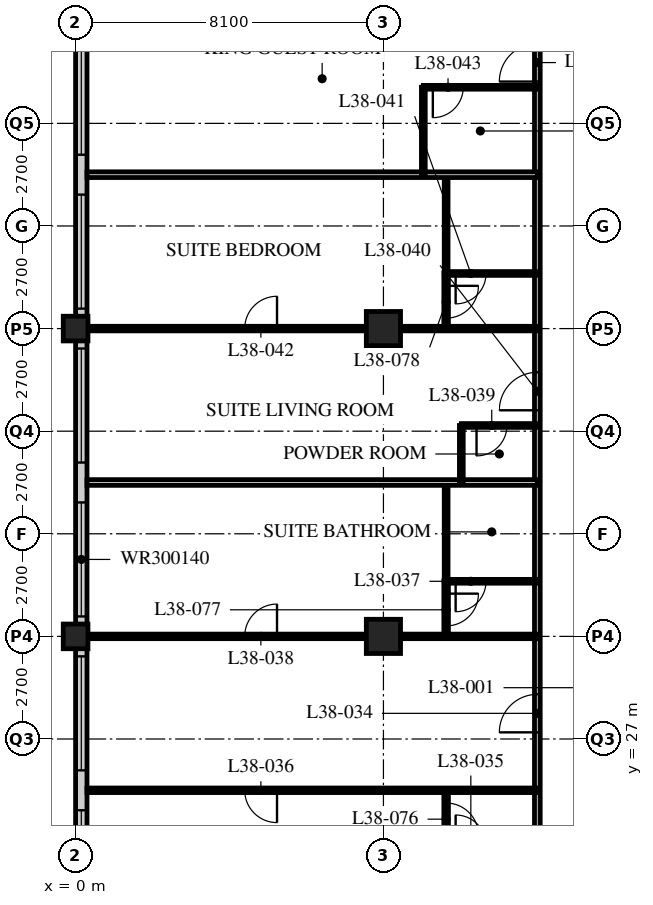
"""IFC4 building model, lengths in metres.
Left out: names, types, materials, properties, quantities, classifications, styles, units other than length and angle.
Written with IfcOpenShell. Run it as: python <this file> out.ifc"""

import sys

from ifc_helpers import new_model, si_unit, direction, frame, frame_2d, origin, origin_2d, place, context, subcontext, project, spatial, rectangle, hollow_rectangle, extrude, element, fill, save


model = new_model("IFC4")
c1 = context("Model", 3, precision=1e-05, world=origin(), true_north=direction((0.0, 1.0)))
c2 = subcontext(c1, "Body", "Model", "MODEL_VIEW")
j1 = project(units=[si_unit("LENGTHUNIT", "METRE"), si_unit("PLANEANGLEUNIT", "RADIAN")], contexts=[c1])
p1 = place(None, origin())
s1 = spatial("IfcSite", under=j1, at=p1, CompositionType="ELEMENT")
p2 = place(p1, origin())
s2 = spatial("IfcBuilding", under=s1, at=p2, CompositionType="ELEMENT")
p3 = place(p2, frame((0.0, 0.0, 147.6)))
s3 = spatial("IfcBuildingStorey", under=s2, at=p3, CompositionType="ELEMENT", Elevation=147.6)
for number, where, z_axis, x_axis in (
    (1, (0.0, 29.7, 0.0), (0.0, 0.0, 1.0), (1.0, 0.0, 0.0)),
    (2, (0.0, 37.8, 0.0), (0.0, 0.0, 1.0), (1.0, 0.0, 0.0)),
):
    element("IfcColumn", number, at=place(p3, frame(where, z_axis=z_axis, x_axis=x_axis)), inside=s3, PredefinedType="COLUMN", context=c2, shape_type="SweptSolid", body=[
        extrude(hollow_rectangle(XDim=0.65, YDim=0.65, WallThickness=0.055, at=origin_2d()), origin(), (0.0, 0.0, 1.0), 3.4),
    ])
for number, where, z_axis, x_axis in (
    (3, (8.1, 29.7, 0.0), (0.0, 0.0, 1.0), (1.0, 0.0, 0.0)),
    (4, (8.1, 37.8, 0.0), (0.0, 0.0, 1.0), (1.0, 0.0, 0.0)),
):
    element("IfcColumn", number, at=place(p3, frame(where, z_axis=z_axis, x_axis=x_axis)), inside=s3, PredefinedType="COLUMN", context=c2, shape_type="SweptSolid", body=[
        extrude(hollow_rectangle(XDim=0.9, YDim=0.9, WallThickness=0.1, at=origin_2d()), origin(), (0.0, 0.0, 1.0), 3.4),
    ])
p4 = place(p3, frame((0.15, 45.6, 0.0), z_axis=(0.0, 0.0, 1.0), x_axis=(0.0, -1.0, 0.0)))
e5 = element("IfcWall", 5, at=p4, inside=s3, PredefinedType="SOLIDWALL", context=c2, shape_type="SweptSolid", body=[
    extrude(rectangle(XDim=32.1, YDim=0.3, at=frame_2d((16.05, 0.0))), origin(), (0.0, 0.0, 1.0), 3.19),
])
p5 = place(p4, frame((0.225, 0.0, 0.9)))
e6 = element("IfcOpeningElement", 6, at=p5, cuts=e5, PredefinedType="OPENING", context=c2, shape_type="SweptSolid", body=[
    extrude(rectangle(XDim=3.0, YDim=1.4, at=frame_2d((1.5, 0.7))), frame((0.0, 0.16, 0.0), z_axis=(0.0, -1.0, 0.0), x_axis=(1.0, 0.0, 0.0)), (0.0, 0.0, 1.0), 0.32),
])
p6 = place(p4, frame((4.275, 0.0, 0.9)))
e7 = element("IfcOpeningElement", 7, at=p6, cuts=e5, PredefinedType="OPENING", context=c2, shape_type="SweptSolid", body=[
    extrude(rectangle(XDim=3.0, YDim=1.4, at=frame_2d((1.5, 0.7))), frame((0.0, 0.16, 0.0), z_axis=(0.0, -1.0, 0.0), x_axis=(1.0, 0.0, 0.0)), (0.0, 0.0, 1.0), 0.32),
])
p7 = place(p4, frame((8.325, 0.0, 0.9)))
e8 = element("IfcOpeningElement", 8, at=p7, cuts=e5, PredefinedType="OPENING", context=c2, shape_type="SweptSolid", body=[
    extrude(rectangle(XDim=3.0, YDim=1.4, at=frame_2d((1.5, 0.7))), frame((0.0, 0.16, 0.0), z_axis=(0.0, -1.0, 0.0), x_axis=(1.0, 0.0, 0.0)), (0.0, 0.0, 1.0), 0.32),
])
p8 = place(p4, frame((12.375, 0.0, 0.9)))
e9 = element("IfcOpeningElement", 9, at=p8, cuts=e5, PredefinedType="OPENING", context=c2, shape_type="SweptSolid", body=[
    extrude(rectangle(XDim=3.0, YDim=1.4, at=frame_2d((1.5, 0.7))), frame((0.0, 0.16, 0.0), z_axis=(0.0, -1.0, 0.0), x_axis=(1.0, 0.0, 0.0)), (0.0, 0.0, 1.0), 0.32),
])
p9 = place(p4, frame((16.425, 0.0, 0.9)))
e10 = element("IfcOpeningElement", 10, at=p9, cuts=e5, PredefinedType="OPENING", context=c2, shape_type="SweptSolid", body=[
    extrude(rectangle(XDim=3.0, YDim=1.4, at=frame_2d((1.5, 0.7))), frame((0.0, 0.16, 0.0), z_axis=(0.0, -1.0, 0.0), x_axis=(1.0, 0.0, 0.0)), (0.0, 0.0, 1.0), 0.32),
])
p10 = place(p4, frame((20.475, 0.0, 0.9)))
e11 = element("IfcOpeningElement", 11, at=p10, cuts=e5, PredefinedType="OPENING", context=c2, shape_type="SweptSolid", body=[
    extrude(rectangle(XDim=3.0, YDim=1.4, at=frame_2d((1.5, 0.7))), frame((0.0, 0.16, 0.0), z_axis=(0.0, -1.0, 0.0), x_axis=(1.0, 0.0, 0.0)), (0.0, 0.0, 1.0), 0.32),
])
p11 = place(p4, frame((24.525, 0.0, 0.9)))
e12 = element("IfcOpeningElement", 12, at=p11, cuts=e5, PredefinedType="OPENING", context=c2, shape_type="SweptSolid", body=[
    extrude(rectangle(XDim=3.0, YDim=1.4, at=frame_2d((1.5, 0.7))), frame((0.0, 0.16, 0.0), z_axis=(0.0, -1.0, 0.0), x_axis=(1.0, 0.0, 0.0)), (0.0, 0.0, 1.0), 0.32),
])
p12 = place(p4, frame((28.575, 0.0, 0.9)))
e13 = element("IfcOpeningElement", 13, at=p12, cuts=e5, PredefinedType="OPENING", context=c2, shape_type="SweptSolid", body=[
    extrude(rectangle(XDim=3.0, YDim=1.4, at=frame_2d((1.5, 0.7))), frame((0.0, 0.16, 0.0), z_axis=(0.0, -1.0, 0.0), x_axis=(1.0, 0.0, 0.0)), (0.0, 0.0, 1.0), 0.32),
])
p13 = place(p3, frame((12.15, 21.6, 0.0), z_axis=(0.0, 0.0, 1.0), x_axis=(0.0, 1.0, 0.0)))
e14 = element("IfcWall", 14, at=p13, inside=s3, PredefinedType="PARTITIONING", context=c2, shape_type="SweptSolid", body=[
    extrude(rectangle(XDim=24.3, YDim=0.15, at=frame_2d((12.15, 0.0))), origin(), (0.0, 0.0, 1.0), 3.19),
])
p14 = place(p13, frame((5.575, 0.0, 0.0)))
e15 = element("IfcOpeningElement", 15, at=p14, cuts=e14, PredefinedType="OPENING", context=c2, shape_type="SweptSolid", body=[
    extrude(rectangle(XDim=1.0, YDim=2.1, at=frame_2d((0.5, 1.05))), frame((0.0, 0.085, 0.0), z_axis=(0.0, -1.0, 0.0), x_axis=(1.0, 0.0, 0.0)), (0.0, 0.0, 1.0), 0.17),
])
p15 = place(p13, frame((14.05, 0.0, 0.0)))
e16 = element("IfcOpeningElement", 16, at=p15, cuts=e14, PredefinedType="OPENING", context=c2, shape_type="SweptSolid", body=[
    extrude(rectangle(XDim=1.0, YDim=2.1, at=frame_2d((0.5, 1.05))), frame((0.0, 0.085, 0.0), z_axis=(0.0, -1.0, 0.0), x_axis=(1.0, 0.0, 0.0)), (0.0, 0.0, 1.0), 0.17),
])
p16 = place(p13, frame((22.7, 0.0, 0.0)))
e17 = element("IfcOpeningElement", 17, at=p16, cuts=e14, PredefinedType="OPENING", context=c2, shape_type="SweptSolid", body=[
    extrude(rectangle(XDim=1.0, YDim=2.1, at=frame_2d((0.5, 1.05))), frame((0.0, 0.085, 0.0), z_axis=(0.0, -1.0, 0.0), x_axis=(1.0, 0.0, 0.0)), (0.0, 0.0, 1.0), 0.17),
])
p17 = place(p3, frame((12.15, 25.65, 0.0), z_axis=(0.0, 0.0, 1.0), x_axis=(-1.0, 0.0, 0.0)))
e18 = element("IfcWall", 18, at=p17, inside=s3, PredefinedType="PARTITIONING", context=c2, shape_type="SweptSolid", body=[
    extrude(rectangle(XDim=11.85, YDim=0.12, at=frame_2d((5.925, 0.0))), origin(), (0.0, 0.0, 1.0), 3.19),
])
p18 = place(p17, frame((6.85, 0.0, 0.0)))
e19 = element("IfcOpeningElement", 19, at=p18, cuts=e18, PredefinedType="OPENING", context=c2, shape_type="SweptSolid", body=[
    extrude(rectangle(XDim=0.85, YDim=2.1, at=frame_2d((0.425, 1.05))), frame((0.0, 0.07, 0.0), z_axis=(0.0, -1.0, 0.0), x_axis=(1.0, 0.0, 0.0)), (0.0, 0.0, 1.0), 0.14),
])
p19 = place(p3, frame((9.75, 31.15, 0.0), z_axis=(0.0, 0.0, 1.0), x_axis=(0.0, 1.0, 0.0)))
e20 = element("IfcWall", 20, at=p19, inside=s3, PredefinedType="PARTITIONING", context=c2, shape_type="SweptSolid", body=[
    extrude(rectangle(XDim=2.6, YDim=0.1, at=frame_2d((1.3, 0.0))), origin(), (0.0, 0.0, 1.0), 3.19),
])
p20 = place(p3, frame((12.15, 31.15, 0.0), z_axis=(0.0, 0.0, 1.0), x_axis=(-1.0, 0.0, 0.0)))
e21 = element("IfcWall", 21, at=p20, inside=s3, PredefinedType="PARTITIONING", context=c2, shape_type="SweptSolid", body=[
    extrude(rectangle(XDim=2.4, YDim=0.1, at=frame_2d((1.2, 0.0))), origin(), (0.0, 0.0, 1.0), 3.19),
])
p21 = place(p20, frame((1.35, 0.0, 0.0)))
e22 = element("IfcOpeningElement", 22, at=p21, cuts=e21, PredefinedType="OPENING", context=c2, shape_type="SweptSolid", body=[
    extrude(rectangle(XDim=0.8, YDim=2.1, at=frame_2d((0.4, 1.05))), frame((0.0, 0.06, 0.0), z_axis=(0.0, -1.0, 0.0), x_axis=(1.0, 0.0, 0.0)), (0.0, 0.0, 1.0), 0.12),
])
p22 = place(p3, frame((12.15, 29.7, 0.0), z_axis=(0.0, 0.0, 1.0), x_axis=(-1.0, 0.0, 0.0)))
e23 = element("IfcWall", 23, at=p22, inside=s3, PredefinedType="PARTITIONING", context=c2, shape_type="SweptSolid", body=[
    extrude(rectangle(XDim=11.85, YDim=0.12, at=frame_2d((5.925, 0.0))), origin(), (0.0, 0.0, 1.0), 2.42),
])
p23 = place(p22, frame((6.85, 0.0, 0.0)))
e24 = element("IfcOpeningElement", 24, at=p23, cuts=e23, PredefinedType="OPENING", context=c2, shape_type="SweptSolid", body=[
    extrude(rectangle(XDim=0.85, YDim=2.1, at=frame_2d((0.425, 1.05))), frame((0.0, 0.07, 0.0), z_axis=(0.0, -1.0, 0.0), x_axis=(1.0, 0.0, 0.0)), (0.0, 0.0, 1.0), 0.14),
])
p24 = place(p3, frame((12.15, 33.75, 0.0), z_axis=(0.0, 0.0, 1.0), x_axis=(-1.0, 0.0, 0.0)))
e25 = element("IfcWall", 25, at=p24, inside=s3, PredefinedType="PARTITIONING", context=c2, shape_type="SweptSolid", body=[
    extrude(rectangle(XDim=11.85, YDim=0.15, at=frame_2d((5.925, 0.0))), origin(), (0.0, 0.0, 1.0), 3.19),
])
p25 = place(p3, frame((10.15, 33.75, 0.0), z_axis=(0.0, 0.0, 1.0), x_axis=(0.0, 1.0, 0.0)))
e26 = element("IfcWall", 26, at=p25, inside=s3, PredefinedType="PARTITIONING", context=c2, shape_type="SweptSolid", body=[
    extrude(rectangle(XDim=1.5, YDim=0.1, at=frame_2d((0.75, 0.0))), origin(), (0.0, 0.0, 1.0), 3.19),
])
p26 = place(p3, frame((12.15, 35.25, 0.0), z_axis=(0.0, 0.0, 1.0), x_axis=(-1.0, 0.0, 0.0)))
e27 = element("IfcWall", 27, at=p26, inside=s3, PredefinedType="PARTITIONING", context=c2, shape_type="SweptSolid", body=[
    extrude(rectangle(XDim=2.0, YDim=0.1, at=frame_2d((1.0, 0.0))), origin(), (0.0, 0.0, 1.0), 3.19),
])
p27 = place(p26, frame((0.8, 0.0, 0.0)))
e28 = element("IfcOpeningElement", 28, at=p27, cuts=e27, PredefinedType="OPENING", context=c2, shape_type="SweptSolid", body=[
    extrude(rectangle(XDim=0.8, YDim=2.1, at=frame_2d((0.4, 1.05))), frame((0.0, 0.06, 0.0), z_axis=(0.0, -1.0, 0.0), x_axis=(1.0, 0.0, 0.0)), (0.0, 0.0, 1.0), 0.12),
])
p28 = place(p3, frame((9.75, 39.25, 0.0), z_axis=(0.0, 0.0, 1.0), x_axis=(0.0, 1.0, 0.0)))
e29 = element("IfcWall", 29, at=p28, inside=s3, PredefinedType="PARTITIONING", context=c2, shape_type="SweptSolid", body=[
    extrude(rectangle(XDim=2.6, YDim=0.1, at=frame_2d((1.3, 0.0))), origin(), (0.0, 0.0, 1.0), 3.19),
])
p29 = place(p3, frame((12.15, 39.25, 0.0), z_axis=(0.0, 0.0, 1.0), x_axis=(-1.0, 0.0, 0.0)))
e30 = element("IfcWall", 30, at=p29, inside=s3, PredefinedType="PARTITIONING", context=c2, shape_type="SweptSolid", body=[
    extrude(rectangle(XDim=2.4, YDim=0.1, at=frame_2d((1.2, 0.0))), origin(), (0.0, 0.0, 1.0), 3.19),
])
p30 = place(p29, frame((1.35, 0.0, 0.0)))
e31 = element("IfcOpeningElement", 31, at=p30, cuts=e30, PredefinedType="OPENING", context=c2, shape_type="SweptSolid", body=[
    extrude(rectangle(XDim=0.8, YDim=2.1, at=frame_2d((0.4, 1.05))), frame((0.0, 0.06, 0.0), z_axis=(0.0, -1.0, 0.0), x_axis=(1.0, 0.0, 0.0)), (0.0, 0.0, 1.0), 0.12),
])
p31 = place(p3, frame((12.15, 37.8, 0.0), z_axis=(0.0, 0.0, 1.0), x_axis=(-1.0, 0.0, 0.0)))
e32 = element("IfcWall", 32, at=p31, inside=s3, PredefinedType="PARTITIONING", context=c2, shape_type="SweptSolid", body=[
    extrude(rectangle(XDim=11.85, YDim=0.12, at=frame_2d((5.925, 0.0))), origin(), (0.0, 0.0, 1.0), 2.42),
])
p32 = place(p31, frame((6.85, 0.0, 0.0)))
e33 = element("IfcOpeningElement", 33, at=p32, cuts=e32, PredefinedType="OPENING", context=c2, shape_type="SweptSolid", body=[
    extrude(rectangle(XDim=0.85, YDim=2.1, at=frame_2d((0.425, 1.05))), frame((0.0, 0.07, 0.0), z_axis=(0.0, -1.0, 0.0), x_axis=(1.0, 0.0, 0.0)), (0.0, 0.0, 1.0), 0.14),
])
p33 = place(p3, frame((12.15, 41.85, 0.0), z_axis=(0.0, 0.0, 1.0), x_axis=(-1.0, 0.0, 0.0)))
e34 = element("IfcWall", 34, at=p33, inside=s3, PredefinedType="PARTITIONING", context=c2, shape_type="SweptSolid", body=[
    extrude(rectangle(XDim=11.85, YDim=0.15, at=frame_2d((5.925, 0.0))), origin(), (0.0, 0.0, 1.0), 3.19),
])
p34 = place(p3, frame((9.15, 41.85, 0.0), z_axis=(0.0, 0.0, 1.0), x_axis=(0.0, 1.0, 0.0)))
e35 = element("IfcWall", 35, at=p34, inside=s3, PredefinedType="PARTITIONING", context=c2, shape_type="SweptSolid", body=[
    extrude(rectangle(XDim=2.3, YDim=0.1, at=frame_2d((1.15, 0.0))), origin(), (0.0, 0.0, 1.0), 3.19),
])
p35 = place(p3, frame((12.15, 44.15, 0.0), z_axis=(0.0, 0.0, 1.0), x_axis=(-1.0, 0.0, 0.0)))
e36 = element("IfcWall", 36, at=p35, inside=s3, PredefinedType="PARTITIONING", context=c2, shape_type="SweptSolid", body=[
    extrude(rectangle(XDim=3.0, YDim=0.1, at=frame_2d((1.5, 0.0))), origin(), (0.0, 0.0, 1.0), 3.19),
])
p36 = place(p35, frame((1.95, 0.0, 0.0)))
e37 = element("IfcOpeningElement", 37, at=p36, cuts=e36, PredefinedType="OPENING", context=c2, shape_type="SweptSolid", body=[
    extrude(rectangle(XDim=0.8, YDim=2.1, at=frame_2d((0.4, 1.05))), frame((0.0, 0.06, 0.0), z_axis=(0.0, -1.0, 0.0), x_axis=(1.0, 0.0, 0.0)), (0.0, 0.0, 1.0), 0.12),
])
p37 = place(p3, frame((9.75, 24.19, 0.0), z_axis=(0.0, 0.0, 1.0), x_axis=(0.0, 1.0, 0.0)))
e38 = element("IfcWall", 38, at=p37, inside=s3, PredefinedType="PARTITIONING", context=c2, shape_type="SweptSolid", body=[
    extrude(rectangle(XDim=1.46, YDim=0.12, at=frame_2d((0.73, 0.0))), origin(), (0.0, 0.0, 1.0), 3.19),
])
p38 = place(p37, frame((0.275, 0.0, 0.0)))
e39 = element("IfcOpeningElement", 39, at=p38, cuts=e38, PredefinedType="OPENING", context=c2, shape_type="SweptSolid", body=[
    extrude(rectangle(XDim=0.85, YDim=2.1, at=frame_2d((0.425, 1.05))), frame((0.0, 0.07, 0.0), z_axis=(0.0, -1.0, 0.0), x_axis=(1.0, 0.0, 0.0)), (0.0, 0.0, 1.0), 0.14),
])
p39 = place(p3, frame((9.75, 29.7, 0.0), z_axis=(0.0, 0.0, 1.0), x_axis=(0.0, 1.0, 0.0)))
e40 = element("IfcWall", 40, at=p39, inside=s3, PredefinedType="PARTITIONING", context=c2, shape_type="SweptSolid", body=[
    extrude(rectangle(XDim=1.46, YDim=0.12, at=frame_2d((0.73, 0.0))), origin(), (0.0, 0.0, 1.0), 3.19),
])
p40 = place(p39, frame((0.275, 0.0, 0.0)))
e41 = element("IfcOpeningElement", 41, at=p40, cuts=e40, PredefinedType="OPENING", context=c2, shape_type="SweptSolid", body=[
    extrude(rectangle(XDim=0.85, YDim=2.1, at=frame_2d((0.425, 1.05))), frame((0.0, 0.07, 0.0), z_axis=(0.0, -1.0, 0.0), x_axis=(1.0, 0.0, 0.0)), (0.0, 0.0, 1.0), 0.14),
])
p41 = place(p3, frame((9.75, 37.8, 0.0), z_axis=(0.0, 0.0, 1.0), x_axis=(0.0, 1.0, 0.0)))
e42 = element("IfcWall", 42, at=p41, inside=s3, PredefinedType="PARTITIONING", context=c2, shape_type="SweptSolid", body=[
    extrude(rectangle(XDim=1.46, YDim=0.12, at=frame_2d((0.73, 0.0))), origin(), (0.0, 0.0, 1.0), 3.19),
])
p42 = place(p41, frame((0.275, 0.0, 0.0)))
e43 = element("IfcOpeningElement", 43, at=p42, cuts=e42, PredefinedType="OPENING", context=c2, shape_type="SweptSolid", body=[
    extrude(rectangle(XDim=0.85, YDim=2.1, at=frame_2d((0.425, 1.05))), frame((0.0, 0.07, 0.0), z_axis=(0.0, -1.0, 0.0), x_axis=(1.0, 0.0, 0.0)), (0.0, 0.0, 1.0), 0.14),
])
p43 = place(p5, origin())
e44 = element("IfcWindow", 44, at=p43, inside=s3, PartitioningType="SINGLE_PANEL", PredefinedType="WINDOW", context=c2, shape_type="SweptSolid", body=[
    extrude(rectangle(XDim=3.0, YDim=1.4, at=frame_2d((1.5, 0.7))), frame((0.0, 0.03, 0.0), z_axis=(0.0, -1.0, 0.0), x_axis=(1.0, 0.0, 0.0)), (0.0, 0.0, 1.0), 0.06),
])
fill(e6, e44)
p44 = place(p6, origin())
e45 = element("IfcWindow", 45, at=p44, inside=s3, PartitioningType="SINGLE_PANEL", PredefinedType="WINDOW", context=c2, shape_type="SweptSolid", body=[
    extrude(rectangle(XDim=3.0, YDim=1.4, at=frame_2d((1.5, 0.7))), frame((0.0, 0.03, 0.0), z_axis=(0.0, -1.0, 0.0), x_axis=(1.0, 0.0, 0.0)), (0.0, 0.0, 1.0), 0.06),
])
fill(e7, e45)
p45 = place(p7, origin())
e46 = element("IfcWindow", 46, at=p45, inside=s3, PartitioningType="SINGLE_PANEL", PredefinedType="WINDOW", context=c2, shape_type="SweptSolid", body=[
    extrude(rectangle(XDim=3.0, YDim=1.4, at=frame_2d((1.5, 0.7))), frame((0.0, 0.03, 0.0), z_axis=(0.0, -1.0, 0.0), x_axis=(1.0, 0.0, 0.0)), (0.0, 0.0, 1.0), 0.06),
])
fill(e8, e46)
p46 = place(p8, origin())
e47 = element("IfcWindow", 47, at=p46, inside=s3, PartitioningType="SINGLE_PANEL", PredefinedType="WINDOW", context=c2, shape_type="SweptSolid", body=[
    extrude(rectangle(XDim=3.0, YDim=1.4, at=frame_2d((1.5, 0.7))), frame((0.0, 0.03, 0.0), z_axis=(0.0, -1.0, 0.0), x_axis=(1.0, 0.0, 0.0)), (0.0, 0.0, 1.0), 0.06),
])
fill(e9, e47)
p47 = place(p9, origin())
e48 = element("IfcWindow", 48, at=p47, inside=s3, PartitioningType="SINGLE_PANEL", PredefinedType="WINDOW", context=c2, shape_type="SweptSolid", body=[
    extrude(rectangle(XDim=3.0, YDim=1.4, at=frame_2d((1.5, 0.7))), frame((0.0, 0.03, 0.0), z_axis=(0.0, -1.0, 0.0), x_axis=(1.0, 0.0, 0.0)), (0.0, 0.0, 1.0), 0.06),
])
fill(e10, e48)
p48 = place(p10, origin())
e49 = element("IfcWindow", 49, at=p48, inside=s3, PartitioningType="SINGLE_PANEL", PredefinedType="WINDOW", context=c2, shape_type="SweptSolid", body=[
    extrude(rectangle(XDim=3.0, YDim=1.4, at=frame_2d((1.5, 0.7))), frame((0.0, 0.03, 0.0), z_axis=(0.0, -1.0, 0.0), x_axis=(1.0, 0.0, 0.0)), (0.0, 0.0, 1.0), 0.06),
])
fill(e11, e49)
p49 = place(p14, origin())
e50 = element("IfcDoor", 50, at=p49, inside=s3, OperationType="SINGLE_SWING_LEFT", PredefinedType="DOOR", context=c2, shape_type="SweptSolid", body=[
    extrude(rectangle(XDim=1.0, YDim=2.1, at=frame_2d((0.5, 1.05))), frame((0.0, 0.025, 0.0), z_axis=(0.0, -1.0, 0.0), x_axis=(1.0, 0.0, 0.0)), (0.0, 0.0, 1.0), 0.05),
])
fill(e15, e50)
p50 = place(p18, origin())
e51 = element("IfcDoor", 51, at=p50, inside=s3, OperationType="SINGLE_SWING_LEFT", PredefinedType="DOOR", context=c2, shape_type="SweptSolid", body=[
    extrude(rectangle(XDim=0.85, YDim=2.1, at=frame_2d((0.425, 1.05))), frame((0.0, 0.025, 0.0), z_axis=(0.0, -1.0, 0.0), x_axis=(1.0, 0.0, 0.0)), (0.0, 0.0, 1.0), 0.05),
])
fill(e19, e51)
p51 = place(p21, origin())
e52 = element("IfcDoor", 52, at=p51, inside=s3, OperationType="SINGLE_SWING_RIGHT", PredefinedType="DOOR", context=c2, shape_type="SweptSolid", body=[
    extrude(rectangle(XDim=0.8, YDim=2.1, at=frame_2d((0.4, 1.05))), frame((0.0, 0.025, 0.0), z_axis=(0.0, -1.0, 0.0), x_axis=(1.0, 0.0, 0.0)), (0.0, 0.0, 1.0), 0.05),
])
fill(e22, e52)
p52 = place(p23, origin())
e53 = element("IfcDoor", 53, at=p52, inside=s3, OperationType="SINGLE_SWING_RIGHT", PredefinedType="DOOR", context=c2, shape_type="SweptSolid", body=[
    extrude(rectangle(XDim=0.85, YDim=2.1, at=frame_2d((0.425, 1.05))), frame((0.0, 0.025, 0.0), z_axis=(0.0, -1.0, 0.0), x_axis=(1.0, 0.0, 0.0)), (0.0, 0.0, 1.0), 0.05),
])
fill(e24, e53)
p53 = place(p27, origin())
e54 = element("IfcDoor", 54, at=p53, inside=s3, OperationType="SINGLE_SWING_RIGHT", PredefinedType="DOOR", context=c2, shape_type="SweptSolid", body=[
    extrude(rectangle(XDim=0.8, YDim=2.1, at=frame_2d((0.4, 1.05))), frame((0.0, 0.025, 0.0), z_axis=(0.0, -1.0, 0.0), x_axis=(1.0, 0.0, 0.0)), (0.0, 0.0, 1.0), 0.05),
])
fill(e28, e54)
p54 = place(p15, origin())
e55 = element("IfcDoor", 55, at=p54, inside=s3, OperationType="SINGLE_SWING_LEFT", PredefinedType="DOOR", context=c2, shape_type="SweptSolid", body=[
    extrude(rectangle(XDim=1.0, YDim=2.1, at=frame_2d((0.5, 1.05))), frame((0.0, 0.025, 0.0), z_axis=(0.0, -1.0, 0.0), x_axis=(1.0, 0.0, 0.0)), (0.0, 0.0, 1.0), 0.05),
])
fill(e16, e55)
p55 = place(p30, origin())
e56 = element("IfcDoor", 56, at=p55, inside=s3, OperationType="SINGLE_SWING_RIGHT", PredefinedType="DOOR", context=c2, shape_type="SweptSolid", body=[
    extrude(rectangle(XDim=0.8, YDim=2.1, at=frame_2d((0.4, 1.05))), frame((0.0, 0.025, 0.0), z_axis=(0.0, -1.0, 0.0), x_axis=(1.0, 0.0, 0.0)), (0.0, 0.0, 1.0), 0.05),
])
fill(e31, e56)
p56 = place(p32, origin())
e57 = element("IfcDoor", 57, at=p56, inside=s3, OperationType="SINGLE_SWING_RIGHT", PredefinedType="DOOR", context=c2, shape_type="SweptSolid", body=[
    extrude(rectangle(XDim=0.85, YDim=2.1, at=frame_2d((0.425, 1.05))), frame((0.0, 0.025, 0.0), z_axis=(0.0, -1.0, 0.0), x_axis=(1.0, 0.0, 0.0)), (0.0, 0.0, 1.0), 0.05),
])
fill(e33, e57)
p57 = place(p36, origin())
e58 = element("IfcDoor", 58, at=p57, inside=s3, OperationType="SINGLE_SWING_RIGHT", PredefinedType="DOOR", context=c2, shape_type="SweptSolid", body=[
    extrude(rectangle(XDim=0.8, YDim=2.1, at=frame_2d((0.4, 1.05))), frame((0.0, 0.025, 0.0), z_axis=(0.0, -1.0, 0.0), x_axis=(1.0, 0.0, 0.0)), (0.0, 0.0, 1.0), 0.05),
])
fill(e37, e58)
p58 = place(p16, origin())
e59 = element("IfcDoor", 59, at=p58, inside=s3, OperationType="SINGLE_SWING_LEFT", PredefinedType="DOOR", context=c2, shape_type="SweptSolid", body=[
    extrude(rectangle(XDim=1.0, YDim=2.1, at=frame_2d((0.5, 1.05))), frame((0.0, 0.025, 0.0), z_axis=(0.0, -1.0, 0.0), x_axis=(1.0, 0.0, 0.0)), (0.0, 0.0, 1.0), 0.05),
])
fill(e17, e59)
p59 = place(p38, origin())
e60 = element("IfcDoor", 60, at=p59, inside=s3, OperationType="SINGLE_SWING_RIGHT", PredefinedType="DOOR", context=c2, shape_type="SweptSolid", body=[
    extrude(rectangle(XDim=0.85, YDim=2.1, at=frame_2d((0.425, 1.05))), frame((0.0, 0.025, 0.0), z_axis=(0.0, -1.0, 0.0), x_axis=(1.0, 0.0, 0.0)), (0.0, 0.0, 1.0), 0.05),
])
fill(e39, e60)
p60 = place(p40, origin())
e61 = element("IfcDoor", 61, at=p60, inside=s3, OperationType="SINGLE_SWING_LEFT", PredefinedType="DOOR", context=c2, shape_type="SweptSolid", body=[
    extrude(rectangle(XDim=0.85, YDim=2.1, at=frame_2d((0.425, 1.05))), frame((0.0, 0.025, 0.0), z_axis=(0.0, -1.0, 0.0), x_axis=(1.0, 0.0, 0.0)), (0.0, 0.0, 1.0), 0.05),
])
fill(e41, e61)
p61 = place(p42, origin())
e62 = element("IfcDoor", 62, at=p61, inside=s3, OperationType="SINGLE_SWING_LEFT", PredefinedType="DOOR", context=c2, shape_type="SweptSolid", body=[
    extrude(rectangle(XDim=0.85, YDim=2.1, at=frame_2d((0.425, 1.05))), frame((0.0, 0.025, 0.0), z_axis=(0.0, -1.0, 0.0), x_axis=(1.0, 0.0, 0.0)), (0.0, 0.0, 1.0), 0.05),
])
fill(e43, e62)
save(model, sys.argv[1])
